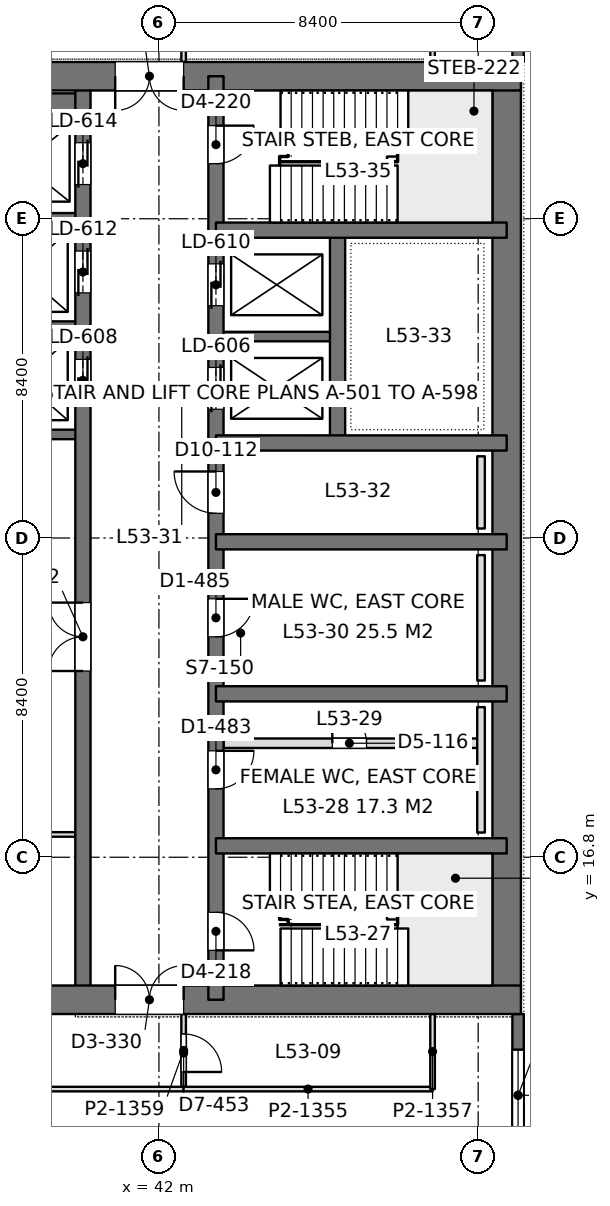
"""IFC4 building model, lengths in metres.
Left out: names, types, materials, properties, quantities, classifications, styles, units other than length and angle.
Written with IfcOpenShell. Run it as: python <this file> out.ifc"""

import sys

from ifc_helpers import new_model, si_unit, direction, frame, frame_2d, origin, place, context, subcontext, project, spatial, rectangle, extrude, element, fill, save


model = new_model("IFC4")
c1 = context("Model", 3, precision=1e-05, world=origin(), true_north=direction((0.0, 1.0)))
c2 = subcontext(c1, "Body", "Model", "MODEL_VIEW")
j1 = project(units=[si_unit("LENGTHUNIT", "METRE"), si_unit("PLANEANGLEUNIT", "RADIAN")], contexts=[c1])
p1 = place(None, origin())
s1 = spatial("IfcSite", under=j1, at=p1, CompositionType="ELEMENT")
p2 = place(p1, origin())
s2 = spatial("IfcBuilding", under=s1, at=p2, CompositionType="ELEMENT")
p3 = place(p2, frame((0.0, 0.0, 232.2)))
s3 = spatial("IfcBuildingStorey", under=s2, at=p3, CompositionType="ELEMENT", Elevation=232.2)
p4 = place(p3, frame((33.675, 13.05, 0.0), z_axis=(0.0, 0.0, 1.0), x_axis=(1.0, 0.0, 0.0)))
e1 = element("IfcWall", 1, at=p4, inside=s3, PredefinedType="SHEAR", context=c2, shape_type="SweptSolid", body=[
    extrude(rectangle(XDim=17.85, YDim=0.75, at=frame_2d((8.925, 0.0))), origin(), (0.0, 0.0, 1.0), 4.2),
])
p5 = place(p4, frame((7.175, 0.0, 0.0)))
e2 = element("IfcOpeningElement", 2, at=p5, cuts=e1, PredefinedType="OPENING", context=c2, shape_type="SweptSolid", body=[
    extrude(rectangle(XDim=1.8, YDim=2.4, at=frame_2d((0.9, 1.2))), frame((0.0, 0.385, 0.0), z_axis=(0.0, -1.0, 0.0), x_axis=(1.0, 0.0, 0.0)), (0.0, 0.0, 1.0), 0.77),
])
p6 = place(p3, frame((33.675, 37.35, 0.0), z_axis=(0.0, 0.0, 1.0), x_axis=(1.0, 0.0, 0.0)))
e3 = element("IfcWall", 3, at=p6, inside=s3, PredefinedType="SHEAR", context=c2, shape_type="SweptSolid", body=[
    extrude(rectangle(XDim=17.85, YDim=0.75, at=frame_2d((8.925, 0.0))), origin(), (0.0, 0.0, 1.0), 4.2),
])
p7 = place(p6, frame((7.175, 0.0, 0.0)))
e4 = element("IfcOpeningElement", 4, at=p7, cuts=e3, PredefinedType="OPENING", context=c2, shape_type="SweptSolid", body=[
    extrude(rectangle(XDim=1.8, YDim=2.4, at=frame_2d((0.9, 1.2))), frame((0.0, 0.385, 0.0), z_axis=(0.0, -1.0, 0.0), x_axis=(1.0, 0.0, 0.0)), (0.0, 0.0, 1.0), 0.77),
])
p8 = place(p3, frame((51.15, 13.05, 0.0), z_axis=(0.0, 0.0, 1.0), x_axis=(0.0, 1.0, 0.0)))
e5 = element("IfcWall", 5, at=p8, inside=s3, PredefinedType="SHEAR", context=c2, shape_type="SweptSolid", body=[
    extrude(rectangle(XDim=24.3, YDim=0.75, at=frame_2d((12.15, 0.0))), origin(), (0.0, 0.0, 1.0), 4.2),
])
p9 = place(p3, frame((43.5, 13.05, 0.0), z_axis=(0.0, 0.0, 1.0), x_axis=(0.0, 1.0, 0.0)))
e6 = element("IfcWall", 6, at=p9, inside=s3, PredefinedType="SHEAR", context=c2, shape_type="SweptSolid", body=[
    extrude(rectangle(XDim=24.3, YDim=0.4, at=frame_2d((12.15, 0.0))), origin(), (0.0, 0.0, 1.0), 4.2),
])
p10 = place(p9, frame((1.3, 0.0, 0.0)))
e7 = element("IfcOpeningElement", 7, at=p10, cuts=e6, PredefinedType="OPENING", context=c2, shape_type="SweptSolid", body=[
    extrude(rectangle(XDim=1.0, YDim=2.2, at=frame_2d((0.5, 1.1))), frame((0.0, 0.21, 0.0), z_axis=(0.0, -1.0, 0.0), x_axis=(1.0, 0.0, 0.0)), (0.0, 0.0, 1.0), 0.42),
])
p11 = place(p9, frame((22.0, 0.0, 0.0)))
e8 = element("IfcOpeningElement", 8, at=p11, cuts=e6, PredefinedType="OPENING", context=c2, shape_type="SweptSolid", body=[
    extrude(rectangle(XDim=1.0, YDim=2.2, at=frame_2d((0.5, 1.1))), frame((0.0, 0.21, 0.0), z_axis=(0.0, -1.0, 0.0), x_axis=(1.0, 0.0, 0.0)), (0.0, 0.0, 1.0), 0.42),
])
p12 = place(p9, frame((5.55, 0.0, 0.0)))
e9 = element("IfcOpeningElement", 9, at=p12, cuts=e6, PredefinedType="OPENING", context=c2, shape_type="SweptSolid", body=[
    extrude(rectangle(XDim=1.0, YDim=2.2, at=frame_2d((0.5, 1.1))), frame((0.0, 0.21, 0.0), z_axis=(0.0, -1.0, 0.0), x_axis=(1.0, 0.0, 0.0)), (0.0, 0.0, 1.0), 0.42),
])
p13 = place(p9, frame((9.55, 0.0, 0.0)))
e10 = element("IfcOpeningElement", 10, at=p13, cuts=e6, PredefinedType="OPENING", context=c2, shape_type="SweptSolid", body=[
    extrude(rectangle(XDim=1.0, YDim=2.2, at=frame_2d((0.5, 1.1))), frame((0.0, 0.21, 0.0), z_axis=(0.0, -1.0, 0.0), x_axis=(1.0, 0.0, 0.0)), (0.0, 0.0, 1.0), 0.42),
])
p14 = place(p9, frame((12.8, 0.0, 0.0)))
e11 = element("IfcOpeningElement", 11, at=p14, cuts=e6, PredefinedType="OPENING", context=c2, shape_type="SweptSolid", body=[
    extrude(rectangle(XDim=1.1, YDim=2.2, at=frame_2d((0.55, 1.1))), frame((0.0, 0.21, 0.0), z_axis=(0.0, -1.0, 0.0), x_axis=(1.0, 0.0, 0.0)), (0.0, 0.0, 1.0), 0.42),
])
p15 = place(p9, frame((15.538, 0.0, 0.0)))
e12 = element("IfcOpeningElement", 12, at=p15, cuts=e6, PredefinedType="OPENING", context=c2, shape_type="SweptSolid", body=[
    extrude(rectangle(XDim=1.1, YDim=2.2, at=frame_2d((0.55, 1.1))), frame((0.0, 0.21, 0.0), z_axis=(0.0, -1.0, 0.0), x_axis=(1.0, 0.0, 0.0)), (0.0, 0.0, 1.0), 0.42),
])
p16 = place(p9, frame((18.262, 0.0, 0.0)))
e13 = element("IfcOpeningElement", 13, at=p16, cuts=e6, PredefinedType="OPENING", context=c2, shape_type="SweptSolid", body=[
    extrude(rectangle(XDim=1.1, YDim=2.2, at=frame_2d((0.55, 1.1))), frame((0.0, 0.21, 0.0), z_axis=(0.0, -1.0, 0.0), x_axis=(1.0, 0.0, 0.0)), (0.0, 0.0, 1.0), 0.42),
])
p17 = place(p3, frame((40.0, 13.05, 0.0), z_axis=(0.0, 0.0, 1.0), x_axis=(0.0, 1.0, 0.0)))
e14 = element("IfcWall", 14, at=p17, inside=s3, PredefinedType="SHEAR", context=c2, shape_type="SweptSolid", body=[
    extrude(rectangle(XDim=24.3, YDim=0.4, at=frame_2d((12.15, 0.0))), origin(), (0.0, 0.0, 1.0), 4.2),
])
p18 = place(p17, frame((15.75, 0.0, 0.0)))
e15 = element("IfcOpeningElement", 15, at=p18, cuts=e14, PredefinedType="OPENING", context=c2, shape_type="SweptSolid", body=[
    extrude(rectangle(XDim=1.1, YDim=2.2, at=frame_2d((0.55, 1.1))), frame((0.0, 0.21, 0.0), z_axis=(0.0, -1.0, 0.0), x_axis=(1.0, 0.0, 0.0)), (0.0, 0.0, 1.0), 0.42),
])
p19 = place(p17, frame((18.6, 0.0, 0.0)))
e16 = element("IfcOpeningElement", 16, at=p19, cuts=e14, PredefinedType="OPENING", context=c2, shape_type="SweptSolid", body=[
    extrude(rectangle(XDim=1.1, YDim=2.2, at=frame_2d((0.55, 1.1))), frame((0.0, 0.21, 0.0), z_axis=(0.0, -1.0, 0.0), x_axis=(1.0, 0.0, 0.0)), (0.0, 0.0, 1.0), 0.42),
])
p20 = place(p17, frame((21.45, 0.0, 0.0)))
e17 = element("IfcOpeningElement", 17, at=p20, cuts=e14, PredefinedType="OPENING", context=c2, shape_type="SweptSolid", body=[
    extrude(rectangle(XDim=1.1, YDim=2.2, at=frame_2d((0.55, 1.1))), frame((0.0, 0.21, 0.0), z_axis=(0.0, -1.0, 0.0), x_axis=(1.0, 0.0, 0.0)), (0.0, 0.0, 1.0), 0.42),
])
p21 = place(p17, frame((8.65, 0.0, 0.0)))
e18 = element("IfcOpeningElement", 18, at=p21, cuts=e14, PredefinedType="OPENING", context=c2, shape_type="SweptSolid", body=[
    extrude(rectangle(XDim=1.8, YDim=2.4, at=frame_2d((0.9, 1.2))), frame((0.0, 0.21, 0.0), z_axis=(0.0, -1.0, 0.0), x_axis=(1.0, 0.0, 0.0)), (0.0, 0.0, 1.0), 0.42),
])
for number, where, z_axis, x_axis in (
    (19, (51.15, 17.1, 0.0), (0.0, 0.0, 1.0), (-1.0, 0.0, 0.0)),
    (20, (51.15, 21.1, 0.0), (0.0, 0.0, 1.0), (-1.0, 0.0, 0.0)),
    (21, (51.15, 25.1, 0.0), (0.0, 0.0, 1.0), (-1.0, 0.0, 0.0)),
    (22, (51.15, 27.7, 0.0), (0.0, 0.0, 1.0), (-1.0, 0.0, 0.0)),
    (23, (51.15, 33.3, 0.0), (0.0, 0.0, 1.0), (-1.0, 0.0, 0.0)),
):
    element("IfcWall", number, at=place(p3, frame(where, z_axis=z_axis, x_axis=x_axis)), inside=s3, PredefinedType="SHEAR", context=c2, shape_type="SweptSolid", body=[
        extrude(rectangle(XDim=7.65, YDim=0.4, at=frame_2d((3.825, 0.0))), origin(), (0.0, 0.0, 1.0), 4.2),
    ])
p22 = place(p3, frame((46.7, 27.7, 0.0), z_axis=(0.0, 0.0, 1.0), x_axis=(0.0, 1.0, 0.0)))
e24 = element("IfcWall", 24, at=p22, inside=s3, PredefinedType="SHEAR", context=c2, shape_type="SweptSolid", body=[
    extrude(rectangle(XDim=5.6, YDim=0.4, at=frame_2d((2.8, 0.0))), origin(), (0.0, 0.0, 1.0), 4.2),
])
p23 = place(p3, frame((46.7, 30.5, 0.0), z_axis=(0.0, 0.0, 1.0), x_axis=(-1.0, 0.0, 0.0)))
e25 = element("IfcWall", 25, at=p23, inside=s3, PredefinedType="SHEAR", context=c2, shape_type="SweptSolid", body=[
    extrude(rectangle(XDim=3.2, YDim=0.25, at=frame_2d((1.6, 0.0))), origin(), (0.0, 0.0, 1.0), 4.2),
])
p24 = place(p3, frame((40.0, 27.925, 0.0), z_axis=(0.0, 0.0, 1.0), x_axis=(-1.0, 0.0, 0.0)))
e26 = element("IfcWall", 26, at=p24, inside=s3, PredefinedType="SHEAR", context=c2, shape_type="SweptSolid", body=[
    extrude(rectangle(XDim=5.95, YDim=0.25, at=frame_2d((2.975, 0.0))), origin(), (0.0, 0.0, 1.0), 4.2),
])
for number, where, z_axis, x_axis in (
    (27, (40.0, 30.775, 0.0), (0.0, 0.0, 1.0), (-1.0, 0.0, 0.0)),
    (28, (40.0, 33.625, 0.0), (0.0, 0.0, 1.0), (-1.0, 0.0, 0.0)),
):
    element("IfcWall", number, at=place(p3, frame(where, z_axis=z_axis, x_axis=x_axis)), inside=s3, PredefinedType="SHEAR", context=c2, shape_type="SweptSolid", body=[
        extrude(rectangle(XDim=3.2, YDim=0.25, at=frame_2d((1.6, 0.0))), origin(), (0.0, 0.0, 1.0), 4.2),
    ])
p25 = place(p3, frame((40.0, 36.625, 0.0), z_axis=(0.0, 0.0, 1.0), x_axis=(-1.0, 0.0, 0.0)))
e29 = element("IfcWall", 29, at=p25, inside=s3, PredefinedType="SHEAR", context=c2, shape_type="SweptSolid", body=[
    extrude(rectangle(XDim=3.2, YDim=0.55, at=frame_2d((1.6, 0.0))), origin(), (0.0, 0.0, 1.0), 4.2),
])
p26 = place(p3, frame((51.45, 42.0, 0.0), z_axis=(0.0, 0.0, 1.0), x_axis=(0.0, -1.0, 0.0)))
e30 = element("IfcWall", 30, at=p26, inside=s3, PredefinedType="SOLIDWALL", context=c2, shape_type="SweptSolid", body=[
    extrude(rectangle(XDim=4.275, YDim=0.3, at=frame_2d((2.137, 0.0))), origin(), (0.0, 0.0, 1.0), 4.05),
])
p27 = place(p26, frame((0.938, 0.0, 0.9)))
e31 = element("IfcOpeningElement", 31, at=p27, cuts=e30, PredefinedType="OPENING", context=c2, shape_type="SweptSolid", body=[
    extrude(rectangle(XDim=2.4, YDim=1.9, at=frame_2d((1.2, 0.95))), frame((0.0, 0.16, 0.0), z_axis=(0.0, -1.0, 0.0), x_axis=(1.0, 0.0, 0.0)), (0.0, 0.0, 1.0), 0.32),
])
p28 = place(p3, frame((51.45, 12.675, 0.0), z_axis=(0.0, 0.0, 1.0), x_axis=(0.0, -1.0, 0.0)))
e32 = element("IfcWall", 32, at=p28, inside=s3, PredefinedType="SOLIDWALL", context=c2, shape_type="SweptSolid", body=[
    extrude(rectangle(XDim=4.275, YDim=0.3, at=frame_2d((2.138, 0.0))), origin(), (0.0, 0.0, 1.0), 4.05),
])
p29 = place(p28, frame((0.938, 0.0, 0.9)))
e33 = element("IfcOpeningElement", 33, at=p29, cuts=e32, PredefinedType="OPENING", context=c2, shape_type="SweptSolid", body=[
    extrude(rectangle(XDim=2.4, YDim=1.9, at=frame_2d((1.2, 0.95))), frame((0.0, 0.16, 0.0), z_axis=(0.0, -1.0, 0.0), x_axis=(1.0, 0.0, 0.0)), (0.0, 0.0, 1.0), 0.32),
])
p30 = place(p3, frame((33.898, 17.4, 0.0), z_axis=(0.0, 0.0, 1.0), x_axis=(1.0, 0.0, 0.0)))
e34 = element("IfcWall", 34, at=p30, inside=s3, PredefinedType="PARTITIONING", context=c2, shape_type="SweptSolid", body=[
    extrude(rectangle(XDim=5.904, YDim=0.12, at=frame_2d((2.952, 0.0))), origin(), (0.0, 0.0, 1.0), 3.55),
])
p31 = place(p3, frame((7.748, 10.7, 0.0), z_axis=(0.0, 0.0, 1.0), x_axis=(1.0, 0.0, 0.0)))
e35 = element("IfcWall", 35, at=p31, inside=s3, PredefinedType="PARTITIONING", context=c2, shape_type="SweptSolid", body=[
    extrude(rectangle(XDim=34.904, YDim=0.12, at=frame_2d((17.452, 0.0))), origin(), (0.0, 0.0, 1.0), 3.55),
])
p32 = place(p31, frame((10.735, 0.0, 0.0)))
e36 = element("IfcOpeningElement", 36, at=p32, cuts=e35, PredefinedType="OPENING", context=c2, shape_type="SweptSolid", body=[
    extrude(rectangle(XDim=1.8, YDim=2.2, at=frame_2d((0.9, 1.1))), frame((0.0, 0.07, 0.0), z_axis=(0.0, -1.0, 0.0), x_axis=(1.0, 0.0, 0.0)), (0.0, 0.0, 1.0), 0.14),
])
p33 = place(p31, frame((22.369, 0.0, 0.0)))
e37 = element("IfcOpeningElement", 37, at=p33, cuts=e35, PredefinedType="OPENING", context=c2, shape_type="SweptSolid", body=[
    extrude(rectangle(XDim=1.8, YDim=2.2, at=frame_2d((0.9, 1.1))), frame((0.0, 0.07, 0.0), z_axis=(0.0, -1.0, 0.0), x_axis=(1.0, 0.0, 0.0)), (0.0, 0.0, 1.0), 0.14),
])
p34 = place(p3, frame((42.65, 10.758, 0.0), z_axis=(0.0, 0.0, 1.0), x_axis=(0.0, 1.0, 0.0)))
e38 = element("IfcWall", 38, at=p34, inside=s3, PredefinedType="PARTITIONING", context=c2, shape_type="SweptSolid", body=[
    extrude(rectangle(XDim=1.918, YDim=0.12, at=frame_2d((0.959, 0.0))), origin(), (0.0, 0.0, 1.0), 4.05),
])
p35 = place(p34, frame((0.392, 0.0, 0.0)))
e39 = element("IfcOpeningElement", 39, at=p35, cuts=e38, PredefinedType="OPENING", context=c2, shape_type="SweptSolid", body=[
    extrude(rectangle(XDim=1.0, YDim=2.4, at=frame_2d((0.5, 1.2))), frame((0.0, 0.07, 0.0), z_axis=(0.0, -1.0, 0.0), x_axis=(1.0, 0.0, 0.0)), (0.0, 0.0, 1.0), 0.14),
])
p36 = place(p3, frame((42.648, 10.7, 0.0), z_axis=(0.0, 0.0, 1.0), x_axis=(1.0, 0.0, 0.0)))
e40 = element("IfcWall", 40, at=p36, inside=s3, PredefinedType="PARTITIONING", context=c2, shape_type="SweptSolid", body=[
    extrude(rectangle(XDim=6.552, YDim=0.12, at=frame_2d((3.276, 0.0))), origin(), (0.0, 0.0, 1.0), 4.05),
])
p37 = place(p3, frame((49.2, 10.7, 0.0), z_axis=(0.0, 0.0, 1.0), x_axis=(0.0, 1.0, 0.0)))
e41 = element("IfcWall", 41, at=p37, inside=s3, PredefinedType="PARTITIONING", context=c2, shape_type="SweptSolid", body=[
    extrude(rectangle(XDim=1.976, YDim=0.12, at=frame_2d((0.988, 0.0))), origin(), (0.0, 0.0, 1.0), 4.05),
])
p38 = place(p3, frame((42.65, 37.724, 0.0), z_axis=(0.0, 0.0, 1.0), x_axis=(0.0, 1.0, 0.0)))
e42 = element("IfcWall", 42, at=p38, inside=s3, PredefinedType="PARTITIONING", context=c2, shape_type="SweptSolid", body=[
    extrude(rectangle(XDim=1.918, YDim=0.12, at=frame_2d((0.959, 0.0))), origin(), (0.0, 0.0, 1.0), 4.05),
])
p39 = place(p38, frame((0.526, 0.0, 0.0)))
e43 = element("IfcOpeningElement", 43, at=p39, cuts=e42, PredefinedType="OPENING", context=c2, shape_type="SweptSolid", body=[
    extrude(rectangle(XDim=1.0, YDim=2.4, at=frame_2d((0.5, 1.2))), frame((0.0, 0.07, 0.0), z_axis=(0.0, -1.0, 0.0), x_axis=(1.0, 0.0, 0.0)), (0.0, 0.0, 1.0), 0.14),
])
p40 = place(p3, frame((49.2, 37.724, 0.0), z_axis=(0.0, 0.0, 1.0), x_axis=(0.0, 1.0, 0.0)))
e44 = element("IfcWall", 44, at=p40, inside=s3, PredefinedType="PARTITIONING", context=c2, shape_type="SweptSolid", body=[
    extrude(rectangle(XDim=1.976, YDim=0.12, at=frame_2d((0.988, 0.0))), origin(), (0.0, 0.0, 1.0), 4.05),
])
p41 = place(p3, frame((43.7, 19.8, 0.0), z_axis=(0.0, 0.0, 1.0), x_axis=(1.0, 0.0, 0.0)))
e45 = element("IfcWall", 45, at=p41, inside=s3, PredefinedType="PARTITIONING", context=c2, shape_type="SweptSolid", body=[
    extrude(rectangle(XDim=6.675, YDim=0.25, at=frame_2d((3.337, 0.0))), origin(), (0.0, 0.0, 1.0), 4.0),
])
p42 = place(p41, frame((2.863, 0.0, 0.0)))
e46 = element("IfcOpeningElement", 46, at=p42, cuts=e45, PredefinedType="OPENING", context=c2, shape_type="SweptSolid", body=[
    extrude(rectangle(XDim=0.9, YDim=2.2, at=frame_2d((0.45, 1.1))), frame((0.0, 0.135, 0.0), z_axis=(0.0, -1.0, 0.0), x_axis=(1.0, 0.0, 0.0)), (0.0, 0.0, 1.0), 0.27),
])
for number, where, z_axis, x_axis in (
    (47, (50.475, 17.45, 0.0), (0.0, 0.0, 1.0), (0.0, 1.0, 0.0)),
    (48, (50.475, 21.45, 0.0), (0.0, 0.0, 1.0), (0.0, 1.0, 0.0)),
):
    element("IfcWall", number, at=place(p3, frame(where, z_axis=z_axis, x_axis=x_axis)), inside=s3, PredefinedType="PLUMBINGWALL", context=c2, shape_type="SweptSolid", body=[
        extrude(rectangle(XDim=3.3, YDim=0.2, at=frame_2d((1.65, 0.0))), origin(), (0.0, 0.0, 1.0), 1.2),
    ])
p43 = place(p3, frame((50.475, 25.45, 0.0), z_axis=(0.0, 0.0, 1.0), x_axis=(0.0, 1.0, 0.0)))
e49 = element("IfcWall", 49, at=p43, inside=s3, PredefinedType="PLUMBINGWALL", context=c2, shape_type="SweptSolid", body=[
    extrude(rectangle(XDim=1.9, YDim=0.2, at=frame_2d((0.95, 0.0))), origin(), (0.0, 0.0, 1.0), 1.2),
])
p44 = place(p29, origin())
e50 = element("IfcWindow", 50, at=p44, inside=s3, PartitioningType="SINGLE_PANEL", PredefinedType="WINDOW", context=c2, shape_type="SweptSolid", body=[
    extrude(rectangle(XDim=2.4, YDim=1.9, at=frame_2d((1.2, 0.95))), frame((0.0, 0.03, 0.0), z_axis=(0.0, -1.0, 0.0), x_axis=(1.0, 0.0, 0.0)), (0.0, 0.0, 1.0), 0.06),
])
fill(e33, e50)
p45 = place(p5, origin())
e51 = element("IfcDoor", 51, at=p45, inside=s3, OperationType="DOUBLE_DOOR_SINGLE_SWING", PredefinedType="DOOR", context=c2, shape_type="SweptSolid", body=[
    extrude(rectangle(XDim=1.8, YDim=2.4, at=frame_2d((0.9, 1.2))), frame((0.0, 0.025, 0.0), z_axis=(0.0, -1.0, 0.0), x_axis=(1.0, 0.0, 0.0)), (0.0, 0.0, 1.0), 0.05),
])
fill(e2, e51)
p46 = place(p7, frame((1.8, 0.0, 0.0), z_axis=(0.0, 0.0, 1.0), x_axis=(-1.0, 0.0, 0.0)))
e52 = element("IfcDoor", 52, at=p46, inside=s3, OperationType="DOUBLE_DOOR_SINGLE_SWING", PredefinedType="DOOR", context=c2, shape_type="SweptSolid", body=[
    extrude(rectangle(XDim=1.8, YDim=2.4, at=frame_2d((0.9, 1.2))), frame((0.0, 0.025, 0.0), z_axis=(0.0, -1.0, 0.0), x_axis=(1.0, 0.0, 0.0)), (0.0, 0.0, 1.0), 0.05),
])
fill(e4, e52)
p47 = place(p10, frame((1.0, 0.0, 0.0), z_axis=(0.0, 0.0, 1.0), x_axis=(-1.0, 0.0, 0.0)))
e53 = element("IfcDoor", 53, at=p47, inside=s3, OperationType="SINGLE_SWING_RIGHT", PredefinedType="DOOR", context=c2, shape_type="SweptSolid", body=[
    extrude(rectangle(XDim=1.0, YDim=2.2, at=frame_2d((0.5, 1.1))), frame((0.0, 0.025, 0.0), z_axis=(0.0, -1.0, 0.0), x_axis=(1.0, 0.0, 0.0)), (0.0, 0.0, 1.0), 0.05),
])
fill(e7, e53)
p48 = place(p11, frame((1.0, 0.0, 0.0), z_axis=(0.0, 0.0, 1.0), x_axis=(-1.0, 0.0, 0.0)))
e54 = element("IfcDoor", 54, at=p48, inside=s3, OperationType="SINGLE_SWING_LEFT", PredefinedType="DOOR", context=c2, shape_type="SweptSolid", body=[
    extrude(rectangle(XDim=1.0, YDim=2.2, at=frame_2d((0.5, 1.1))), frame((0.0, 0.025, 0.0), z_axis=(0.0, -1.0, 0.0), x_axis=(1.0, 0.0, 0.0)), (0.0, 0.0, 1.0), 0.05),
])
fill(e8, e54)
p49 = place(p12, frame((1.0, 0.0, 0.0), z_axis=(0.0, 0.0, 1.0), x_axis=(-1.0, 0.0, 0.0)))
e55 = element("IfcDoor", 55, at=p49, inside=s3, OperationType="SINGLE_SWING_LEFT", PredefinedType="DOOR", context=c2, shape_type="SweptSolid", body=[
    extrude(rectangle(XDim=1.0, YDim=2.2, at=frame_2d((0.5, 1.1))), frame((0.0, 0.025, 0.0), z_axis=(0.0, -1.0, 0.0), x_axis=(1.0, 0.0, 0.0)), (0.0, 0.0, 1.0), 0.05),
])
fill(e9, e55)
p50 = place(p13, frame((1.0, 0.0, 0.0), z_axis=(0.0, 0.0, 1.0), x_axis=(-1.0, 0.0, 0.0)))
e56 = element("IfcDoor", 56, at=p50, inside=s3, OperationType="SINGLE_SWING_LEFT", PredefinedType="DOOR", context=c2, shape_type="SweptSolid", body=[
    extrude(rectangle(XDim=1.0, YDim=2.2, at=frame_2d((0.5, 1.1))), frame((0.0, 0.025, 0.0), z_axis=(0.0, -1.0, 0.0), x_axis=(1.0, 0.0, 0.0)), (0.0, 0.0, 1.0), 0.05),
])
fill(e10, e56)
p51 = place(p14, origin())
e57 = element("IfcDoor", 57, at=p51, inside=s3, OperationType="SINGLE_SWING_RIGHT", PredefinedType="DOOR", context=c2, shape_type="SweptSolid", body=[
    extrude(rectangle(XDim=1.1, YDim=2.2, at=frame_2d((0.55, 1.1))), frame((0.0, 0.025, 0.0), z_axis=(0.0, -1.0, 0.0), x_axis=(1.0, 0.0, 0.0)), (0.0, 0.0, 1.0), 0.05),
])
fill(e11, e57)
p52 = place(p18, origin())
e58 = element("IfcDoor", 58, at=p52, inside=s3, OperationType="DOUBLE_DOOR_SLIDING", PredefinedType="DOOR", context=c2, shape_type="SweptSolid", body=[
    extrude(rectangle(XDim=1.1, YDim=2.2, at=frame_2d((0.55, 1.1))), frame((0.0, 0.025, 0.0), z_axis=(0.0, -1.0, 0.0), x_axis=(1.0, 0.0, 0.0)), (0.0, 0.0, 1.0), 0.05),
])
fill(e15, e58)
p53 = place(p19, origin())
e59 = element("IfcDoor", 59, at=p53, inside=s3, OperationType="DOUBLE_DOOR_SLIDING", PredefinedType="DOOR", context=c2, shape_type="SweptSolid", body=[
    extrude(rectangle(XDim=1.1, YDim=2.2, at=frame_2d((0.55, 1.1))), frame((0.0, 0.025, 0.0), z_axis=(0.0, -1.0, 0.0), x_axis=(1.0, 0.0, 0.0)), (0.0, 0.0, 1.0), 0.05),
])
fill(e16, e59)
p54 = place(p20, origin())
e60 = element("IfcDoor", 60, at=p54, inside=s3, OperationType="DOUBLE_DOOR_SLIDING", PredefinedType="DOOR", context=c2, shape_type="SweptSolid", body=[
    extrude(rectangle(XDim=1.1, YDim=2.2, at=frame_2d((0.55, 1.1))), frame((0.0, 0.025, 0.0), z_axis=(0.0, -1.0, 0.0), x_axis=(1.0, 0.0, 0.0)), (0.0, 0.0, 1.0), 0.05),
])
fill(e17, e60)
p55 = place(p15, origin())
e61 = element("IfcDoor", 61, at=p55, inside=s3, OperationType="DOUBLE_DOOR_SLIDING", PredefinedType="DOOR", context=c2, shape_type="SweptSolid", body=[
    extrude(rectangle(XDim=1.1, YDim=2.2, at=frame_2d((0.55, 1.1))), frame((0.0, 0.025, 0.0), z_axis=(0.0, -1.0, 0.0), x_axis=(1.0, 0.0, 0.0)), (0.0, 0.0, 1.0), 0.05),
])
fill(e12, e61)
p56 = place(p16, origin())
e62 = element("IfcDoor", 62, at=p56, inside=s3, OperationType="DOUBLE_DOOR_SLIDING", PredefinedType="DOOR", context=c2, shape_type="SweptSolid", body=[
    extrude(rectangle(XDim=1.1, YDim=2.2, at=frame_2d((0.55, 1.1))), frame((0.0, 0.025, 0.0), z_axis=(0.0, -1.0, 0.0), x_axis=(1.0, 0.0, 0.0)), (0.0, 0.0, 1.0), 0.05),
])
fill(e13, e62)
p57 = place(p21, origin())
e63 = element("IfcDoor", 63, at=p57, inside=s3, OperationType="DOUBLE_DOOR_SINGLE_SWING", PredefinedType="DOOR", context=c2, shape_type="SweptSolid", body=[
    extrude(rectangle(XDim=1.8, YDim=2.4, at=frame_2d((0.9, 1.2))), frame((0.0, 0.025, 0.0), z_axis=(0.0, -1.0, 0.0), x_axis=(1.0, 0.0, 0.0)), (0.0, 0.0, 1.0), 0.05),
])
fill(e18, e63)
p58 = place(p35, frame((1.0, 0.0, 0.0), z_axis=(0.0, 0.0, 1.0), x_axis=(-1.0, 0.0, 0.0)))
e64 = element("IfcDoor", 64, at=p58, inside=s3, OperationType="SINGLE_SWING_RIGHT", PredefinedType="DOOR", context=c2, shape_type="SweptSolid", body=[
    extrude(rectangle(XDim=1.0, YDim=2.4, at=frame_2d((0.5, 1.2))), frame((0.0, 0.025, 0.0), z_axis=(0.0, -1.0, 0.0), x_axis=(1.0, 0.0, 0.0)), (0.0, 0.0, 1.0), 0.05),
])
fill(e39, e64)
p59 = place(p42, origin())
e65 = element("IfcDoor", 65, at=p59, inside=s3, OperationType="SINGLE_SWING_LEFT", PredefinedType="DOOR", context=c2, shape_type="SweptSolid", body=[
    extrude(rectangle(XDim=0.9, YDim=2.2, at=frame_2d((0.45, 1.1))), frame((0.0, 0.025, 0.0), z_axis=(0.0, -1.0, 0.0), x_axis=(1.0, 0.0, 0.0)), (0.0, 0.0, 1.0), 0.05),
])
fill(e46, e65)
save(model, sys.argv[1])
